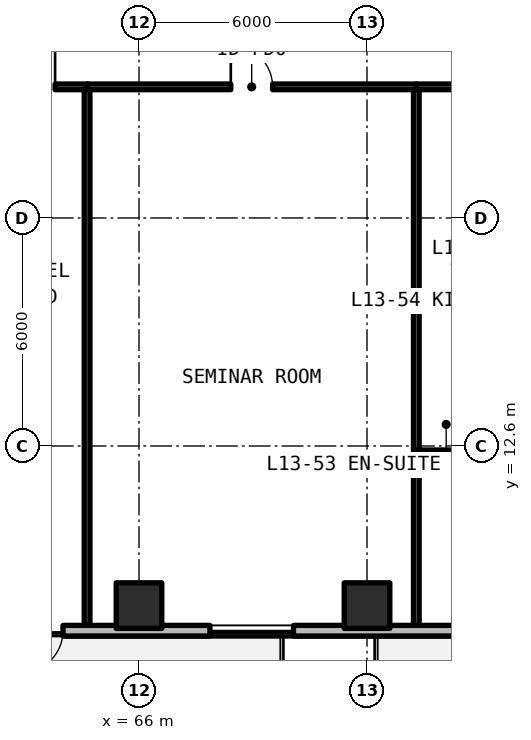
"""IFC4 building model, lengths in metres.
Left out: names, types, materials, properties, quantities, classifications, styles, units other than length and angle.
Written with IfcOpenShell. Run it as: python <this file> out.ifc"""

import sys

from ifc_helpers import new_model, si_unit, direction, frame, frame_2d, origin, origin_2d, place, context, subcontext, project, spatial, rectangle, extrude, element, fill, save


model = new_model("IFC4")
c1 = context("Model", 3, precision=1e-05, world=origin(), true_north=direction((0.0, 1.0)))
c2 = subcontext(c1, "Body", "Model", "MODEL_VIEW")
j1 = project(units=[si_unit("LENGTHUNIT", "METRE"), si_unit("PLANEANGLEUNIT", "RADIAN")], contexts=[c1])
p1 = place(None, origin())
s1 = spatial("IfcSite", under=j1, at=p1, CompositionType="ELEMENT")
p2 = place(p1, origin())
s2 = spatial("IfcBuilding", under=s1, at=p2, CompositionType="ELEMENT")
p3 = place(p2, frame((0.0, 0.0, 48.84)))
s3 = spatial("IfcBuildingStorey", under=s2, at=p3, CompositionType="ELEMENT", Elevation=48.84)
for number, where, z_axis, x_axis in (
    (1, (66.0, 8.4, 0.0), (0.0, 0.0, 1.0), (1.0, 0.0, 0.0)),
    (2, (72.0, 8.4, 0.0), (0.0, 0.0, 1.0), (1.0, 0.0, 0.0)),
):
    element("IfcColumn", number, at=place(p3, frame(where, z_axis=z_axis, x_axis=x_axis)), inside=s3, PredefinedType="COLUMN", context=c2, shape_type="SweptSolid", body=[
        extrude(rectangle(XDim=1.2, YDim=1.2, at=origin_2d()), origin(), (0.0, 0.0, 1.0), 3.3),
    ])
p4 = place(p3, frame((52.14, 7.74, 0.0), z_axis=(0.0, 0.0, 1.0), x_axis=(1.0, 0.0, 0.0)))
e3 = element("IfcWall", 3, at=p4, inside=s3, PredefinedType="SOLIDWALL", context=c2, shape_type="SweptSolid", body=[
    extrude(rectangle(XDim=44.402, YDim=0.28, at=frame_2d((22.201, 0.0))), origin(), (0.0, 0.0, 1.0), 3.08),
])
p5 = place(p4, frame((10.76, 0.0, 0.0)))
e4 = element("IfcOpeningElement", 4, at=p5, cuts=e3, PredefinedType="OPENING", context=c2, shape_type="SweptSolid", body=[
    extrude(rectangle(XDim=1.1, YDim=2.15, at=frame_2d((0.55, 1.075))), frame((0.0, 0.15, 0.0), z_axis=(0.0, -1.0, 0.0), x_axis=(1.0, 0.0, 0.0)), (0.0, 0.0, 1.0), 0.3),
])
p6 = place(p4, frame((22.86, 0.0, 0.0)))
e5 = element("IfcOpeningElement", 5, at=p6, cuts=e3, PredefinedType="OPENING", context=c2, shape_type="SweptSolid", body=[
    extrude(rectangle(XDim=1.1, YDim=2.15, at=frame_2d((0.55, 1.075))), frame((0.0, 0.15, 0.0), z_axis=(0.0, -1.0, 0.0), x_axis=(1.0, 0.0, 0.0)), (0.0, 0.0, 1.0), 0.3),
])
p7 = place(p4, frame((34.96, 0.0, 0.0)))
e6 = element("IfcOpeningElement", 6, at=p7, cuts=e3, PredefinedType="OPENING", context=c2, shape_type="SweptSolid", body=[
    extrude(rectangle(XDim=1.1, YDim=2.15, at=frame_2d((0.55, 1.075))), frame((0.0, 0.15, 0.0), z_axis=(0.0, -1.0, 0.0), x_axis=(1.0, 0.0, 0.0)), (0.0, 0.0, 1.0), 0.3),
])
p8 = place(p4, frame((2.728, 0.0, 0.78)))
e7 = element("IfcOpeningElement", 7, at=p8, cuts=e3, PredefinedType="OPENING", context=c2, shape_type="SweptSolid", body=[
    extrude(rectangle(XDim=2.2, YDim=1.66, at=frame_2d((1.1, 0.83))), frame((0.0, 0.15, 0.0), z_axis=(0.0, -1.0, 0.0), x_axis=(1.0, 0.0, 0.0)), (0.0, 0.0, 1.0), 0.3),
])
p9 = place(p4, frame((6.393, 0.0, 0.78)))
e8 = element("IfcOpeningElement", 8, at=p9, cuts=e3, PredefinedType="OPENING", context=c2, shape_type="SweptSolid", body=[
    extrude(rectangle(XDim=0.85, YDim=1.65, at=frame_2d((0.425, 0.825))), frame((0.0, 0.15, 0.0), z_axis=(0.0, -1.0, 0.0), x_axis=(1.0, 0.0, 0.0)), (0.0, 0.0, 1.0), 0.3),
])
p10 = place(p4, frame((15.726, 0.0, 0.78)))
e9 = element("IfcOpeningElement", 9, at=p10, cuts=e3, PredefinedType="OPENING", context=c2, shape_type="SweptSolid", body=[
    extrude(rectangle(XDim=2.2, YDim=1.66, at=frame_2d((1.1, 0.83))), frame((0.0, 0.15, 0.0), z_axis=(0.0, -1.0, 0.0), x_axis=(1.0, 0.0, 0.0)), (0.0, 0.0, 1.0), 0.3),
])
p11 = place(p4, frame((28.873, 0.0, 0.78)))
e10 = element("IfcOpeningElement", 10, at=p11, cuts=e3, PredefinedType="OPENING", context=c2, shape_type="SweptSolid", body=[
    extrude(rectangle(XDim=2.2, YDim=1.66, at=frame_2d((1.1, 0.83))), frame((0.0, 0.15, 0.0), z_axis=(0.0, -1.0, 0.0), x_axis=(1.0, 0.0, 0.0)), (0.0, 0.0, 1.0), 0.3),
])
p12 = place(p4, frame((38.612, 0.0, 0.78)))
e11 = element("IfcOpeningElement", 11, at=p12, cuts=e3, PredefinedType="OPENING", context=c2, shape_type="SweptSolid", body=[
    extrude(rectangle(XDim=0.85, YDim=1.65, at=frame_2d((0.425, 0.825))), frame((0.0, 0.15, 0.0), z_axis=(0.0, -1.0, 0.0), x_axis=(1.0, 0.0, 0.0)), (0.0, 0.0, 1.0), 0.3),
])
p13 = place(p4, frame((41.006, 0.0, 0.78)))
e12 = element("IfcOpeningElement", 12, at=p13, cuts=e3, PredefinedType="OPENING", context=c2, shape_type="SweptSolid", body=[
    extrude(rectangle(XDim=2.2, YDim=1.66, at=frame_2d((1.1, 0.83))), frame((0.0, 0.15, 0.0), z_axis=(0.0, -1.0, 0.0), x_axis=(1.0, 0.0, 0.0)), (0.0, 0.0, 1.0), 0.3),
])
p14 = place(p3, frame((64.634, 7.88, 0.0), z_axis=(0.0, 0.0, 1.0), x_axis=(0.0, 1.0, 0.0)))
e13 = element("IfcWall", 13, at=p14, inside=s3, PredefinedType="SOLIDWALL", context=c2, shape_type="SweptSolid", body=[
    extrude(rectangle(XDim=14.17, YDim=0.15, at=frame_2d((7.085, 0.0))), origin(), (0.0, 0.0, 1.0), 2.35),
])
p15 = place(p3, frame((57.896, 22.05, 0.0), z_axis=(0.0, 0.0, 1.0), x_axis=(1.0, 0.0, 0.0)))
e14 = element("IfcWall", 14, at=p15, inside=s3, PredefinedType="SOLIDWALL", context=c2, shape_type="SweptSolid", body=[
    extrude(rectangle(XDim=6.738, YDim=0.15, at=frame_2d((3.369, 0.0))), origin(), (0.0, 0.0, 1.0), 2.35),
])
p16 = place(p15, frame((4.946, 0.0, 0.0)))
e15 = element("IfcOpeningElement", 15, at=p16, cuts=e14, PredefinedType="OPENING", context=c2, shape_type="SweptSolid", body=[
    extrude(rectangle(XDim=0.95, YDim=2.15, at=frame_2d((0.475, 1.075))), frame((0.0, 0.085, 0.0), z_axis=(0.0, -1.0, 0.0), x_axis=(1.0, 0.0, 0.0)), (0.0, 0.0, 1.0), 0.17),
])
p17 = place(p3, frame((73.298, 7.88, 0.0), z_axis=(0.0, 0.0, 1.0), x_axis=(0.0, 1.0, 0.0)))
e16 = element("IfcWall", 16, at=p17, inside=s3, PredefinedType="SOLIDWALL", context=c2, shape_type="SweptSolid", body=[
    extrude(rectangle(XDim=14.17, YDim=0.15, at=frame_2d((7.085, 0.0))), origin(), (0.0, 0.0, 1.0), 2.35),
])
p18 = place(p3, frame((64.634, 22.05, 0.0), z_axis=(0.0, 0.0, 1.0), x_axis=(1.0, 0.0, 0.0)))
e17 = element("IfcWall", 17, at=p18, inside=s3, PredefinedType="SOLIDWALL", context=c2, shape_type="SweptSolid", body=[
    extrude(rectangle(XDim=8.664, YDim=0.15, at=frame_2d((4.332, 0.0))), origin(), (0.0, 0.0, 1.0), 2.35),
])
p19 = place(p18, frame((3.782, 0.0, 0.0)))
e18 = element("IfcOpeningElement", 18, at=p19, cuts=e17, PredefinedType="OPENING", context=c2, shape_type="SweptSolid", body=[
    extrude(rectangle(XDim=1.1, YDim=2.15, at=frame_2d((0.55, 1.075))), frame((0.0, 0.085, 0.0), z_axis=(0.0, -1.0, 0.0), x_axis=(1.0, 0.0, 0.0)), (0.0, 0.0, 1.0), 0.17),
])
p20 = place(p3, frame((73.298, 16.368, 0.0), z_axis=(0.0, 0.0, 1.0), x_axis=(1.0, 0.0, 0.0)))
e19 = element("IfcWall", 19, at=p20, inside=s3, PredefinedType="PARTITIONING", context=c2, shape_type="SweptSolid", body=[
    extrude(rectangle(XDim=2.209, YDim=0.15, at=frame_2d((1.104, 0.0))), origin(), (0.0, 0.0, 1.0), 2.35),
])
p21 = place(p3, frame((73.298, 12.42, 0.0), z_axis=(0.0, 0.0, 1.0), x_axis=(1.0, 0.0, 0.0)))
e20 = element("IfcWall", 20, at=p21, inside=s3, PredefinedType="PARTITIONING", context=c2, shape_type="SweptSolid", body=[
    extrude(rectangle(XDim=6.498, YDim=0.15, at=frame_2d((3.249, 0.0))), origin(), (0.0, 0.0, 1.0), 2.35),
])
p22 = place(p21, frame((3.969, 0.0, 0.0)))
e21 = element("IfcOpeningElement", 21, at=p22, cuts=e20, PredefinedType="OPENING", context=c2, shape_type="SweptSolid", body=[
    extrude(rectangle(XDim=0.85, YDim=2.1, at=frame_2d((0.425, 1.05))), frame((0.0, 0.085, 0.0), z_axis=(0.0, -1.0, 0.0), x_axis=(1.0, 0.0, 0.0)), (0.0, 0.0, 1.0), 0.17),
])
p23 = place(p3, frame((73.298, 22.05, 0.0), z_axis=(0.0, 0.0, 1.0), x_axis=(1.0, 0.0, 0.0)))
e22 = element("IfcWall", 22, at=p23, inside=s3, PredefinedType="SOLIDWALL", context=c2, shape_type="SweptSolid", body=[
    extrude(rectangle(XDim=6.498, YDim=0.15, at=frame_2d((3.249, 0.0))), origin(), (0.0, 0.0, 1.0), 2.35),
])
p24 = place(p23, frame((3.918, 0.0, 0.0)))
e23 = element("IfcOpeningElement", 23, at=p24, cuts=e22, PredefinedType="OPENING", context=c2, shape_type="SweptSolid", body=[
    extrude(rectangle(XDim=0.95, YDim=2.15, at=frame_2d((0.475, 1.075))), frame((0.0, 0.085, 0.0), z_axis=(0.0, -1.0, 0.0), x_axis=(1.0, 0.0, 0.0)), (0.0, 0.0, 1.0), 0.17),
])
p25 = place(p5, frame((1.1, 0.0, 0.0), z_axis=(0.0, 0.0, 1.0), x_axis=(-1.0, 0.0, 0.0)))
e24 = element("IfcDoor", 24, at=p25, inside=s3, OperationType="SINGLE_SWING_LEFT", PredefinedType="DOOR", context=c2, shape_type="SweptSolid", body=[
    extrude(rectangle(XDim=1.1, YDim=2.15, at=frame_2d((0.55, 1.075))), frame((0.0, 0.025, 0.0), z_axis=(0.0, -1.0, 0.0), x_axis=(1.0, 0.0, 0.0)), (0.0, 0.0, 1.0), 0.05),
])
fill(e4, e24)
p26 = place(p10, origin())
e25 = element("IfcWindow", 25, at=p26, inside=s3, PartitioningType="SINGLE_PANEL", PredefinedType="WINDOW", context=c2, shape_type="SweptSolid", body=[
    extrude(rectangle(XDim=2.2, YDim=1.66, at=frame_2d((1.1, 0.83))), frame((0.0, 0.03, 0.0), z_axis=(0.0, -1.0, 0.0), x_axis=(1.0, 0.0, 0.0)), (0.0, 0.0, 1.0), 0.06),
])
fill(e9, e25)
p27 = place(p16, origin())
e26 = element("IfcDoor", 26, at=p27, inside=s3, OperationType="SINGLE_SWING_RIGHT", PredefinedType="DOOR", context=c2, shape_type="SweptSolid", body=[
    extrude(rectangle(XDim=0.95, YDim=2.15, at=frame_2d((0.475, 1.075))), frame((0.0, 0.025, 0.0), z_axis=(0.0, -1.0, 0.0), x_axis=(1.0, 0.0, 0.0)), (0.0, 0.0, 1.0), 0.05),
])
fill(e15, e26)
p28 = place(p19, origin())
e27 = element("IfcDoor", 27, at=p28, inside=s3, OperationType="SINGLE_SWING_LEFT", PredefinedType="DOOR", context=c2, shape_type="SweptSolid", body=[
    extrude(rectangle(XDim=1.1, YDim=2.15, at=frame_2d((0.55, 1.075))), frame((0.0, 0.025, 0.0), z_axis=(0.0, -1.0, 0.0), x_axis=(1.0, 0.0, 0.0)), (0.0, 0.0, 1.0), 0.05),
])
fill(e18, e27)
save(model, sys.argv[1])
